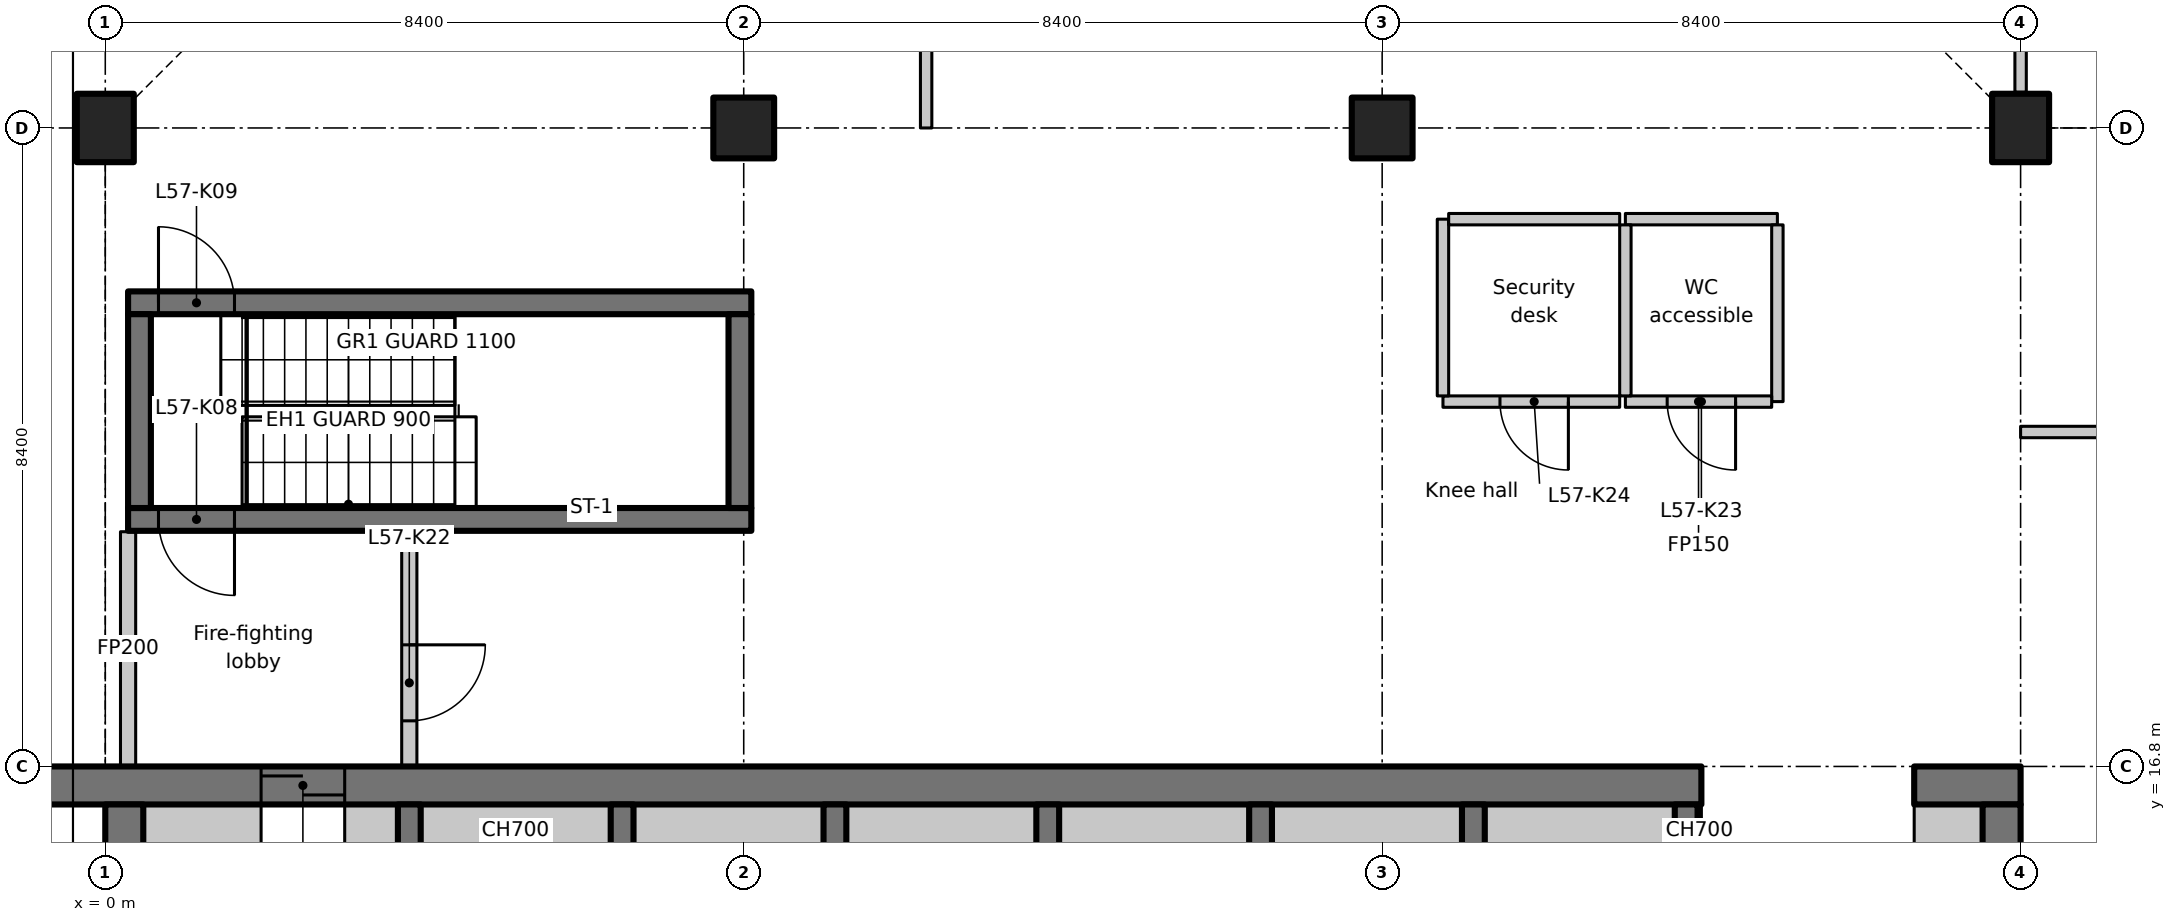
"""IFC4 building model, lengths in metres.
Left out: names, types, materials, properties, quantities, classifications, styles, units other than length and angle.
Written with IfcOpenShell. Run it as: python <this file> out.ifc"""

import sys

from ifc_helpers import new_model, si_unit, direction, frame, frame_2d, origin, origin_2d, place, context, subcontext, project, spatial, polyline, rectangle, outline, extrude, element, fill, save


model = new_model("IFC4")
c1 = context("Model", 3, precision=1e-05, world=origin(), true_north=direction((0.0, 1.0)))
c2 = subcontext(c1, "Body", "Model", "MODEL_VIEW")
j1 = project(units=[si_unit("LENGTHUNIT", "METRE"), si_unit("PLANEANGLEUNIT", "RADIAN")], contexts=[c1])
p1 = place(None, origin())
s1 = spatial("IfcSite", under=j1, at=p1, CompositionType="ELEMENT")
p2 = place(p1, origin())
s2 = spatial("IfcBuilding", under=s1, at=p2, CompositionType="ELEMENT")
p3 = place(p2, frame((0.0, 0.0, 226.5)))
s3 = spatial("IfcBuildingStorey", under=s2, at=p3, CompositionType="ELEMENT", Elevation=226.5)
p4 = place(p3, frame((0.0, 25.2, 0.0), z_axis=(0.0, 0.0, 1.0), x_axis=(1.0, 0.0, 0.0)))
e1 = element("IfcColumn", 1, at=p4, inside=s3, PredefinedType="COLUMN", context=c2, shape_type="SweptSolid", body=[
    extrude(rectangle(XDim=0.75, YDim=0.9, at=origin_2d()), origin(), (0.0, 0.0, 1.0), 3.35),
])
for number, where, z_axis, x_axis in (
    (2, (8.4, 25.2, 0.0), (0.0, 0.0, 1.0), (1.0, 0.0, 0.0)),
    (3, (16.8, 25.2, 0.0), (0.0, 0.0, 1.0), (1.0, 0.0, 0.0)),
):
    element("IfcColumn", number, at=place(p3, frame(where, z_axis=z_axis, x_axis=x_axis)), inside=s3, PredefinedType="COLUMN", context=c2, shape_type="SweptSolid", body=[
        extrude(rectangle(XDim=0.8, YDim=0.8, at=origin_2d()), origin(), (0.0, 0.0, 1.0), 3.35),
    ])
p5 = place(p3, frame((25.2, 25.2, 0.0), z_axis=(0.0, 0.0, 1.0), x_axis=(1.0, 0.0, 0.0)))
e4 = element("IfcColumn", 4, at=p5, inside=s3, PredefinedType="COLUMN", context=c2, shape_type="SweptSolid", body=[
    extrude(rectangle(XDim=0.75, YDim=0.9, at=origin_2d()), origin(), (0.0, 0.0, 1.0), 3.35),
])
p6 = place(p3, frame((-1.1, 16.55, 0.0), z_axis=(0.0, 0.0, 1.0), x_axis=(1.0, 0.0, 0.0)))
e5 = element("IfcWall", 5, at=p6, inside=s3, PredefinedType="SHEAR", context=c2, shape_type="SweptSolid", body=[
    extrude(rectangle(XDim=22.1, YDim=0.5, at=frame_2d((11.05, 0.0))), origin(), (0.0, 0.0, 1.0), 3.35),
])
p7 = place(p6, frame((3.15, 0.0, 0.0)))
e6 = element("IfcOpeningElement", 6, at=p7, cuts=e5, PredefinedType="OPENING", context=c2, shape_type="SweptSolid", body=[
    extrude(rectangle(XDim=1.1, YDim=2.3, at=frame_2d((0.55, 1.15))), frame((0.0, 0.26, 0.0), z_axis=(0.0, -1.0, 0.0), x_axis=(1.0, 0.0, 0.0)), (0.0, 0.0, 1.0), 0.52),
])
p8 = place(p3, frame((23.8, 16.55, 0.0), z_axis=(0.0, 0.0, 1.0), x_axis=(1.0, 0.0, 0.0)))
e7 = element("IfcWall", 7, at=p8, inside=s3, PredefinedType="SHEAR", context=c2, shape_type="SweptSolid", body=[
    extrude(rectangle(XDim=1.4, YDim=0.5, at=frame_2d((0.7, 0.0))), origin(), (0.0, 0.0, 1.0), 3.35),
])
p9 = place(p3, frame((0.25, 7.436, 0.0), z_axis=(0.0, 0.0, 1.0), x_axis=(0.0, 1.0, 0.0)))
e8 = element("IfcWall", 8, at=p9, inside=s3, PredefinedType="SHEAR", context=c2, shape_type="SweptSolid", body=[
    extrude(rectangle(XDim=8.864, YDim=0.5, at=frame_2d((4.432, 0.0))), origin(), (0.0, 0.0, 1.0), 3.35),
])
p10 = place(p3, frame((24.95, 12.6, 0.0), z_axis=(0.0, 0.0, 1.0), x_axis=(0.0, 1.0, 0.0)))
e9 = element("IfcWall", 9, at=p10, inside=s3, PredefinedType="SHEAR", context=c2, shape_type="SweptSolid", body=[
    extrude(rectangle(XDim=3.7, YDim=0.5, at=frame_2d((1.85, 0.0))), origin(), (0.0, 0.0, 1.0), 3.35),
])
p11 = place(p3, frame((0.5, 15.95, 0.0), z_axis=(0.0, 0.0, 1.0), x_axis=(1.0, 0.0, 0.0)))
e10 = element("IfcWall", 10, at=p11, inside=s3, PredefinedType="PARTITIONING", context=c2, shape_type="SweptSolid", body=[
    extrude(rectangle(XDim=1.55, YDim=0.7, at=frame_2d((0.775, 0.0))), origin(), (0.0, 0.0, 1.0), 3.35),
])
p12 = place(p3, frame((23.8, 15.95, 0.0), z_axis=(0.0, 0.0, 1.0), x_axis=(1.0, 0.0, 0.0)))
e11 = element("IfcWall", 11, at=p12, inside=s3, PredefinedType="PARTITIONING", context=c2, shape_type="SweptSolid", body=[
    extrude(rectangle(XDim=0.9, YDim=0.7, at=frame_2d((0.45, 0.0))), origin(), (0.0, 0.0, 1.0), 3.35),
])
for number, where, z_axis, x_axis in (
    (12, (4.0, 12.95, 0.0), (0.0, 0.0, 1.0), (0.0, 1.0, 0.0)),
    (13, (6.8, 12.95, 0.0), (0.0, 0.0, 1.0), (0.0, 1.0, 0.0)),
    (14, (9.6, 12.95, 0.0), (0.0, 0.0, 1.0), (0.0, 1.0, 0.0)),
    (15, (12.4, 12.95, 0.0), (0.0, 0.0, 1.0), (0.0, 1.0, 0.0)),
    (16, (15.2, 12.95, 0.0), (0.0, 0.0, 1.0), (0.0, 1.0, 0.0)),
    (17, (18.0, 12.95, 0.0), (0.0, 0.0, 1.0), (0.0, 1.0, 0.0)),
    (18, (20.8, 12.95, 0.0), (0.0, 0.0, 1.0), (0.0, 1.0, 0.0)),
):
    element("IfcWall", number, at=place(p3, frame(where, z_axis=z_axis, x_axis=x_axis)), inside=s3, PredefinedType="SHEAR", context=c2, shape_type="SweptSolid", body=[
        extrude(rectangle(XDim=3.35, YDim=0.3, at=frame_2d((1.675, 0.0))), origin(), (0.0, 0.0, 1.0), 3.35),
    ])
p13 = place(p3, frame((8.5, 20.05, 0.0), z_axis=(0.0, 0.0, 1.0), x_axis=(-1.0, 0.0, 0.0)))
e19 = element("IfcWall", 19, at=p13, inside=s3, PredefinedType="SHEAR", context=c2, shape_type="SweptSolid", body=[
    extrude(rectangle(XDim=8.2, YDim=0.3, at=frame_2d((4.1, 0.0))), origin(), (0.0, 0.0, 1.0), 3.35),
])
p14 = place(p13, frame((6.8, 0.0, 0.0)))
e20 = element("IfcOpeningElement", 20, at=p14, cuts=e19, PredefinedType="OPENING", context=c2, shape_type="SweptSolid", body=[
    extrude(rectangle(XDim=1.0, YDim=2.1, at=frame_2d((0.5, 1.05))), frame((0.0, 0.16, 0.0), z_axis=(0.0, -1.0, 0.0), x_axis=(1.0, 0.0, 0.0)), (0.0, 0.0, 1.0), 0.32),
])
p15 = place(p3, frame((0.3, 22.9, 0.0), z_axis=(0.0, 0.0, 1.0), x_axis=(1.0, 0.0, 0.0)))
e21 = element("IfcWall", 21, at=p15, inside=s3, PredefinedType="SHEAR", context=c2, shape_type="SweptSolid", body=[
    extrude(rectangle(XDim=8.2, YDim=0.3, at=frame_2d((4.1, 0.0))), origin(), (0.0, 0.0, 1.0), 3.35),
])
p16 = place(p15, frame((0.4, 0.0, 0.0)))
e22 = element("IfcOpeningElement", 22, at=p16, cuts=e21, PredefinedType="OPENING", context=c2, shape_type="SweptSolid", body=[
    extrude(rectangle(XDim=1.0, YDim=2.1, at=frame_2d((0.5, 1.05))), frame((0.0, 0.16, 0.0), z_axis=(0.0, -1.0, 0.0), x_axis=(1.0, 0.0, 0.0)), (0.0, 0.0, 1.0), 0.32),
])
for number, where, z_axis, x_axis in (
    (23, (0.45, 20.2, 0.0), (0.0, 0.0, 1.0), (0.0, 1.0, 0.0)),
    (24, (8.35, 20.2, 0.0), (0.0, 0.0, 1.0), (0.0, 1.0, 0.0)),
):
    element("IfcWall", number, at=place(p3, frame(where, z_axis=z_axis, x_axis=x_axis)), inside=s3, PredefinedType="SHEAR", context=c2, shape_type="SweptSolid", body=[
        extrude(rectangle(XDim=2.55, YDim=0.3, at=frame_2d((1.275, 0.0))), origin(), (0.0, 0.0, 1.0), 3.35),
    ])
p17 = place(p3, frame((0.3, 16.812, 0.0), z_axis=(0.0, 0.0, 1.0), x_axis=(0.0, 1.0, 0.0)))
e25 = element("IfcWall", 25, at=p17, inside=s3, PredefinedType="PARTITIONING", context=c2, shape_type="SweptSolid", body=[
    extrude(rectangle(XDim=3.076, YDim=0.2, at=frame_2d((1.538, 0.0))), origin(), (0.0, 0.0, 1.0), 2.98),
])
p18 = place(p3, frame((4.0, 19.888, 0.0), z_axis=(0.0, 0.0, 1.0), x_axis=(0.0, -1.0, 0.0)))
e26 = element("IfcWall", 26, at=p18, inside=s3, PredefinedType="PARTITIONING", context=c2, shape_type="SweptSolid", body=[
    extrude(rectangle(XDim=3.076, YDim=0.2, at=frame_2d((1.538, 0.0))), origin(), (0.0, 0.0, 1.0), 3.35),
])
p19 = place(p18, frame((1.488, 0.0, 0.0)))
e27 = element("IfcOpeningElement", 27, at=p19, cuts=e26, PredefinedType="OPENING", context=c2, shape_type="SweptSolid", body=[
    extrude(rectangle(XDim=1.0, YDim=2.1, at=frame_2d((0.5, 1.05))), frame((0.0, 0.11, 0.0), z_axis=(0.0, -1.0, 0.0), x_axis=(1.0, 0.0, 0.0)), (0.0, 0.0, 1.0), 0.22),
])
p20 = place(p3, frame((20.0, 24.0, 0.0), z_axis=(0.0, 0.0, 1.0), x_axis=(1.0, 0.0, 0.0)))
e28 = element("IfcWall", 28, at=p20, inside=s3, PredefinedType="PARTITIONING", context=c2, shape_type="SweptSolid", body=[
    extrude(rectangle(XDim=2.0, YDim=0.15, at=frame_2d((1.0, 0.0))), origin(), (0.0, 0.0, 1.0), 3.35),
])
p21 = place(p3, frame((22.0, 23.925, 0.0), z_axis=(0.0, 0.0, 1.0), x_axis=(0.0, -1.0, 0.0)))
e29 = element("IfcWall", 29, at=p21, inside=s3, PredefinedType="PARTITIONING", context=c2, shape_type="SweptSolid", body=[
    extrude(rectangle(XDim=2.325, YDim=0.15, at=frame_2d((1.163, 0.0))), origin(), (0.0, 0.0, 1.0), 3.35),
])
p22 = place(p3, frame((21.925, 21.6, 0.0), z_axis=(0.0, 0.0, 1.0), x_axis=(-1.0, 0.0, 0.0)))
e30 = element("IfcWall", 30, at=p22, inside=s3, PredefinedType="PARTITIONING", context=c2, shape_type="SweptSolid", body=[
    extrude(rectangle(XDim=1.925, YDim=0.15, at=frame_2d((0.962, 0.0))), origin(), (0.0, 0.0, 1.0), 3.35),
])
p23 = place(p22, frame((0.475, 0.0, 0.0)))
e31 = element("IfcOpeningElement", 31, at=p23, cuts=e30, PredefinedType="OPENING", context=c2, shape_type="SweptSolid", body=[
    extrude(rectangle(XDim=0.9, YDim=2.1, at=frame_2d((0.45, 1.05))), frame((0.0, 0.085, 0.0), z_axis=(0.0, -1.0, 0.0), x_axis=(1.0, 0.0, 0.0)), (0.0, 0.0, 1.0), 0.17),
])
p24 = place(p3, frame((20.0, 21.675, 0.0), z_axis=(0.0, 0.0, 1.0), x_axis=(0.0, 1.0, 0.0)))
e32 = element("IfcWall", 32, at=p24, inside=s3, PredefinedType="PARTITIONING", context=c2, shape_type="SweptSolid", body=[
    extrude(rectangle(XDim=2.25, YDim=0.15, at=frame_2d((1.125, 0.0))), origin(), (0.0, 0.0, 1.0), 3.35),
])
p25 = place(p3, frame((19.925, 21.6, 0.0), z_axis=(0.0, 0.0, 1.0), x_axis=(-1.0, 0.0, 0.0)))
e33 = element("IfcWall", 33, at=p25, inside=s3, PredefinedType="PARTITIONING", context=c2, shape_type="SweptSolid", body=[
    extrude(rectangle(XDim=2.325, YDim=0.15, at=frame_2d((1.163, 0.0))), origin(), (0.0, 0.0, 1.0), 3.35),
])
p26 = place(p25, frame((0.675, 0.0, 0.0)))
e34 = element("IfcOpeningElement", 34, at=p26, cuts=e33, PredefinedType="OPENING", context=c2, shape_type="SweptSolid", body=[
    extrude(rectangle(XDim=0.9, YDim=2.1, at=frame_2d((0.45, 1.05))), frame((0.0, 0.085, 0.0), z_axis=(0.0, -1.0, 0.0), x_axis=(1.0, 0.0, 0.0)), (0.0, 0.0, 1.0), 0.17),
])
p27 = place(p3, frame((17.6, 21.675, 0.0), z_axis=(0.0, 0.0, 1.0), x_axis=(0.0, 1.0, 0.0)))
e35 = element("IfcWall", 35, at=p27, inside=s3, PredefinedType="PARTITIONING", context=c2, shape_type="SweptSolid", body=[
    extrude(rectangle(XDim=2.325, YDim=0.15, at=frame_2d((1.163, 0.0))), origin(), (0.0, 0.0, 1.0), 3.35),
])
p28 = place(p3, frame((17.675, 24.0, 0.0), z_axis=(0.0, 0.0, 1.0), x_axis=(1.0, 0.0, 0.0)))
e36 = element("IfcWall", 36, at=p28, inside=s3, PredefinedType="PARTITIONING", context=c2, shape_type="SweptSolid", body=[
    extrude(rectangle(XDim=2.25, YDim=0.15, at=frame_2d((1.125, 0.0))), origin(), (0.0, 0.0, 1.0), 3.35),
])
p29 = place(p3, frame((3.15, 15.95, 0.0), z_axis=(0.0, 0.0, 1.0), x_axis=(1.0, 0.0, 0.0)))
e37 = element("IfcWall", 37, at=p29, inside=s3, PredefinedType="PARTITIONING", context=c2, shape_type="SweptSolid", body=[
    extrude(rectangle(XDim=0.7, YDim=0.7, at=frame_2d((0.35, 0.0))), origin(), (0.0, 0.0, 1.0), 3.35),
])
for number, where, z_axis, x_axis in (
    (38, (4.15, 15.95, 0.0), (0.0, 0.0, 1.0), (1.0, 0.0, 0.0)),
    (39, (6.95, 15.95, 0.0), (0.0, 0.0, 1.0), (1.0, 0.0, 0.0)),
    (40, (9.75, 15.95, 0.0), (0.0, 0.0, 1.0), (1.0, 0.0, 0.0)),
    (41, (12.55, 15.95, 0.0), (0.0, 0.0, 1.0), (1.0, 0.0, 0.0)),
    (42, (15.35, 15.95, 0.0), (0.0, 0.0, 1.0), (1.0, 0.0, 0.0)),
    (43, (18.15, 15.95, 0.0), (0.0, 0.0, 1.0), (1.0, 0.0, 0.0)),
):
    element("IfcWall", number, at=place(p3, frame(where, z_axis=z_axis, x_axis=x_axis)), inside=s3, PredefinedType="PARTITIONING", context=c2, shape_type="SweptSolid", body=[
        extrude(rectangle(XDim=2.5, YDim=0.7, at=frame_2d((1.25, 0.0))), origin(), (0.0, 0.0, 1.0), 3.35),
    ])
p30 = place(p3, frame((20.95, 15.95, 0.0), z_axis=(0.0, 0.0, 1.0), x_axis=(1.0, 0.0, 0.0)))
e44 = element("IfcWall", 44, at=p30, inside=s3, PredefinedType="PARTITIONING", context=c2, shape_type="SweptSolid", body=[
    extrude(rectangle(XDim=0.05, YDim=0.7, at=frame_2d((0.025, 0.0))), origin(), (0.0, 0.0, 1.0), 3.35),
])
p31 = place(p3, frame((25.2, 21.2, 0.0), z_axis=(0.0, 0.0, 1.0), x_axis=(1.0, 0.0, 0.0)))
e45 = element("IfcWall", 45, at=p31, inside=s3, PredefinedType="PARTITIONING", context=c2, shape_type="SweptSolid", body=[
    extrude(rectangle(XDim=4.2, YDim=0.15, at=frame_2d((2.1, 0.0))), origin(), (0.0, 0.0, 1.0), 3.33),
])
p32 = place(p31, frame((1.5, 0.0, 0.0)))
e46 = element("IfcOpeningElement", 46, at=p32, cuts=e45, PredefinedType="OPENING", context=c2, shape_type="SweptSolid", body=[
    extrude(rectangle(XDim=1.0, YDim=2.1, at=frame_2d((0.5, 1.05))), frame((0.0, 0.085, 0.0), z_axis=(0.0, -1.0, 0.0), x_axis=(1.0, 0.0, 0.0)), (0.0, 0.0, 1.0), 0.17),
])
p33 = place(p3, frame((25.2, 25.67, 0.0), z_axis=(0.0, 0.0, 1.0), x_axis=(0.0, 1.0, 0.0)))
e47 = element("IfcWall", 47, at=p33, inside=s3, PredefinedType="PARTITIONING", context=c2, shape_type="SweptSolid", body=[
    extrude(rectangle(XDim=4.487, YDim=0.15, at=frame_2d((2.243, 0.0))), origin(), (0.0, 0.0, 1.0), 2.98),
])
p34 = place(p3, frame((10.8, 25.2, 0.0), z_axis=(0.0, 0.0, 1.0), x_axis=(0.0, 1.0, 0.0)))
e48 = element("IfcWall", 48, at=p34, inside=s3, PredefinedType="PARTITIONING", context=c2, shape_type="SweptSolid", body=[
    extrude(outline(polyline([(0.0, 0.0), (8.4, 0.0), (8.4, 2.98), (7.952, 2.98), (7.95, 3.33), (0.0, 3.33), (0.0, 0.0)])), frame((0.0, 0.075, 0.0), z_axis=(0.0, -1.0, 0.0), x_axis=(1.0, 0.0, 0.0)), (0.0, 0.0, 1.0), 0.15),
])
p35 = place(p34, frame((3.3, 0.0, 0.0)))
e49 = element("IfcOpeningElement", 49, at=p35, cuts=e48, PredefinedType="OPENING", context=c2, shape_type="SweptSolid", body=[
    extrude(rectangle(XDim=1.6, YDim=2.1, at=frame_2d((0.8, 1.05))), frame((0.0, 0.085, 0.0), z_axis=(0.0, -1.0, 0.0), x_axis=(1.0, 0.0, 0.0)), (0.0, 0.0, 1.0), 0.17),
])
p36 = place(p7, origin())
e50 = element("IfcDoor", 50, at=p36, inside=s3, OperationType="SLIDING_TO_LEFT", PredefinedType="DOOR", context=c2, shape_type="SweptSolid", body=[
    extrude(rectangle(XDim=1.1, YDim=2.3, at=frame_2d((0.55, 1.15))), frame((0.0, 0.025, 0.0), z_axis=(0.0, -1.0, 0.0), x_axis=(1.0, 0.0, 0.0)), (0.0, 0.0, 1.0), 0.05),
])
fill(e6, e50)
p37 = place(p14, origin())
e51 = element("IfcDoor", 51, at=p37, inside=s3, OperationType="SINGLE_SWING_RIGHT", PredefinedType="DOOR", context=c2, shape_type="SweptSolid", body=[
    extrude(rectangle(XDim=1.0, YDim=2.1, at=frame_2d((0.5, 1.05))), frame((0.0, 0.025, 0.0), z_axis=(0.0, -1.0, 0.0), x_axis=(1.0, 0.0, 0.0)), (0.0, 0.0, 1.0), 0.05),
])
fill(e20, e51)
p38 = place(p16, origin())
e52 = element("IfcDoor", 52, at=p38, inside=s3, OperationType="SINGLE_SWING_LEFT", PredefinedType="DOOR", context=c2, shape_type="SweptSolid", body=[
    extrude(rectangle(XDim=1.0, YDim=2.1, at=frame_2d((0.5, 1.05))), frame((0.0, 0.025, 0.0), z_axis=(0.0, -1.0, 0.0), x_axis=(1.0, 0.0, 0.0)), (0.0, 0.0, 1.0), 0.05),
])
fill(e22, e52)
p39 = place(p19, origin())
e53 = element("IfcDoor", 53, at=p39, inside=s3, OperationType="SINGLE_SWING_RIGHT", PredefinedType="DOOR", context=c2, shape_type="SweptSolid", body=[
    extrude(rectangle(XDim=1.0, YDim=2.1, at=frame_2d((0.5, 1.05))), frame((0.0, 0.025, 0.0), z_axis=(0.0, -1.0, 0.0), x_axis=(1.0, 0.0, 0.0)), (0.0, 0.0, 1.0), 0.05),
])
fill(e27, e53)
p40 = place(p23, origin())
e54 = element("IfcDoor", 54, at=p40, inside=s3, OperationType="SINGLE_SWING_LEFT", PredefinedType="DOOR", context=c2, shape_type="SweptSolid", body=[
    extrude(rectangle(XDim=0.9, YDim=2.1, at=frame_2d((0.45, 1.05))), frame((0.0, 0.025, 0.0), z_axis=(0.0, -1.0, 0.0), x_axis=(1.0, 0.0, 0.0)), (0.0, 0.0, 1.0), 0.05),
])
fill(e31, e54)
p41 = place(p26, origin())
e55 = element("IfcDoor", 55, at=p41, inside=s3, OperationType="SINGLE_SWING_RIGHT", PredefinedType="DOOR", context=c2, shape_type="SweptSolid", body=[
    extrude(rectangle(XDim=0.9, YDim=2.1, at=frame_2d((0.45, 1.05))), frame((0.0, 0.025, 0.0), z_axis=(0.0, -1.0, 0.0), x_axis=(1.0, 0.0, 0.0)), (0.0, 0.0, 1.0), 0.05),
])
fill(e34, e55)
save(model, sys.argv[1])
